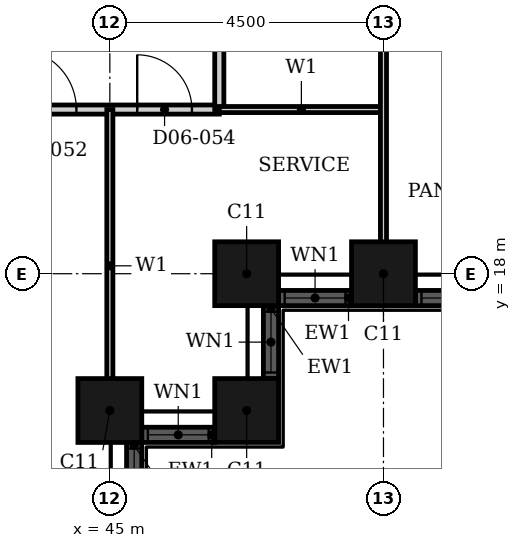
"""IFC4 building model, lengths in metres.
Left out: names, types, materials, properties, quantities, classifications, styles, units other than length and angle.
Written with IfcOpenShell. Run it as: python <this file> out.ifc"""

import sys

from ifc_helpers import new_model, si_unit, direction, frame, frame_2d, origin, origin_2d, place, context, subcontext, project, spatial, rectangle, hollow_rectangle, extrude, element, fill, save


model = new_model("IFC4")
c1 = context("Model", 3, precision=1e-05, world=origin(), true_north=direction((0.0, 1.0)))
c2 = subcontext(c1, "Body", "Model", "MODEL_VIEW")
j1 = project(units=[si_unit("LENGTHUNIT", "METRE"), si_unit("PLANEANGLEUNIT", "RADIAN")], contexts=[c1])
p1 = place(None, origin())
s1 = spatial("IfcSite", under=j1, at=p1, CompositionType="ELEMENT")
p2 = place(p1, origin())
s2 = spatial("IfcBuilding", under=s1, at=p2, CompositionType="ELEMENT")
p3 = place(p2, frame((0.0, 0.0, 33.6)))
s3 = spatial("IfcBuildingStorey", under=s2, at=p3, CompositionType="ELEMENT", Elevation=33.6)
for number, where, z_axis, x_axis in (
    (1, (45.0, 15.75, 0.0), (0.0, 0.0, 1.0), (1.0, 0.0, 0.0)),
    (2, (47.25, 15.75, 0.0), (0.0, 0.0, 1.0), (1.0, 0.0, 0.0)),
    (3, (47.25, 18.0, 0.0), (0.0, 0.0, 1.0), (1.0, 0.0, 0.0)),
    (4, (49.5, 18.0, 0.0), (0.0, 0.0, 1.0), (1.0, 0.0, 0.0)),
):
    element("IfcColumn", number, at=place(p3, frame(where, z_axis=z_axis, x_axis=x_axis)), inside=s3, PredefinedType="COLUMN", context=c2, shape_type="SweptSolid", body=[
        extrude(hollow_rectangle(XDim=1.05, YDim=1.05, WallThickness=0.034, at=origin_2d()), origin(), (0.0, 0.0, 1.0), 3.6),
    ])
p4 = place(p3, frame((45.4, 14.025, 0.0), z_axis=(0.0, 0.0, 1.0), x_axis=(0.0, 1.0, 0.0)))
e5 = element("IfcWall", 5, at=p4, inside=s3, PredefinedType="SOLIDWALL", context=c2, shape_type="SweptSolid", body=[
    extrude(rectangle(XDim=1.2, YDim=0.25, at=frame_2d((0.6, 0.0))), origin(), (0.0, 0.0, 1.0), 3.6),
])
p5 = place(p4, frame((0.1, 0.0, 0.9)))
e6 = element("IfcOpeningElement", 6, at=p5, cuts=e5, PredefinedType="OPENING", context=c2, shape_type="SweptSolid", body=[
    extrude(rectangle(XDim=1.0, YDim=2.08, at=frame_2d((0.5, 1.04))), frame((0.0, 0.135, 0.0), z_axis=(0.0, -1.0, 0.0), x_axis=(1.0, 0.0, 0.0)), (0.0, 0.0, 1.0), 0.27),
])
p6 = place(p3, frame((45.525, 15.35, 0.0), z_axis=(0.0, 0.0, 1.0), x_axis=(1.0, 0.0, 0.0)))
e7 = element("IfcWall", 7, at=p6, inside=s3, PredefinedType="SOLIDWALL", context=c2, shape_type="SweptSolid", body=[
    extrude(rectangle(XDim=1.2, YDim=0.25, at=frame_2d((0.6, 0.0))), origin(), (0.0, 0.0, 1.0), 3.6),
])
p7 = place(p6, frame((0.1, 0.0, 0.9)))
e8 = element("IfcOpeningElement", 8, at=p7, cuts=e7, PredefinedType="OPENING", context=c2, shape_type="SweptSolid", body=[
    extrude(rectangle(XDim=1.0, YDim=2.08, at=frame_2d((0.5, 1.04))), frame((0.0, 0.135, 0.0), z_axis=(0.0, -1.0, 0.0), x_axis=(1.0, 0.0, 0.0)), (0.0, 0.0, 1.0), 0.27),
])
p8 = place(p3, frame((47.65, 16.275, 0.0), z_axis=(0.0, 0.0, 1.0), x_axis=(0.0, 1.0, 0.0)))
e9 = element("IfcWall", 9, at=p8, inside=s3, PredefinedType="SOLIDWALL", context=c2, shape_type="SweptSolid", body=[
    extrude(rectangle(XDim=1.2, YDim=0.25, at=frame_2d((0.6, 0.0))), origin(), (0.0, 0.0, 1.0), 3.6),
])
p9 = place(p8, frame((0.1, 0.0, 0.9)))
e10 = element("IfcOpeningElement", 10, at=p9, cuts=e9, PredefinedType="OPENING", context=c2, shape_type="SweptSolid", body=[
    extrude(rectangle(XDim=1.0, YDim=2.08, at=frame_2d((0.5, 1.04))), frame((0.0, 0.135, 0.0), z_axis=(0.0, -1.0, 0.0), x_axis=(1.0, 0.0, 0.0)), (0.0, 0.0, 1.0), 0.27),
])
p10 = place(p3, frame((47.775, 17.6, 0.0), z_axis=(0.0, 0.0, 1.0), x_axis=(1.0, 0.0, 0.0)))
e11 = element("IfcWall", 11, at=p10, inside=s3, PredefinedType="SOLIDWALL", context=c2, shape_type="SweptSolid", body=[
    extrude(rectangle(XDim=1.2, YDim=0.25, at=frame_2d((0.6, 0.0))), origin(), (0.0, 0.0, 1.0), 3.6),
])
p11 = place(p10, frame((0.1, 0.0, 0.9)))
e12 = element("IfcOpeningElement", 12, at=p11, cuts=e11, PredefinedType="OPENING", context=c2, shape_type="SweptSolid", body=[
    extrude(rectangle(XDim=1.0, YDim=2.08, at=frame_2d((0.5, 1.04))), frame((0.0, 0.135, 0.0), z_axis=(0.0, -1.0, 0.0), x_axis=(1.0, 0.0, 0.0)), (0.0, 0.0, 1.0), 0.27),
])
p12 = place(p3, frame((50.025, 17.6, 0.0), z_axis=(0.0, 0.0, 1.0), x_axis=(1.0, 0.0, 0.0)))
e13 = element("IfcWall", 13, at=p12, inside=s3, PredefinedType="SOLIDWALL", context=c2, shape_type="SweptSolid", body=[
    extrude(rectangle(XDim=7.95, YDim=0.25, at=frame_2d((3.975, 0.0))), origin(), (0.0, 0.0, 1.0), 3.6),
])
p13 = place(p12, frame((0.1, 0.0, 0.9)))
e14 = element("IfcOpeningElement", 14, at=p13, cuts=e13, PredefinedType="OPENING", context=c2, shape_type="SweptSolid", body=[
    extrude(rectangle(XDim=3.25, YDim=2.08, at=frame_2d((1.625, 1.04))), frame((0.0, 0.135, 0.0), z_axis=(0.0, -1.0, 0.0), x_axis=(1.0, 0.0, 0.0)), (0.0, 0.0, 1.0), 0.27),
])
p14 = place(p12, frame((5.325, 0.0, 0.0)))
e15 = element("IfcOpeningElement", 15, at=p14, cuts=e13, PredefinedType="OPENING", context=c2, shape_type="SweptSolid", body=[
    extrude(rectangle(XDim=1.8, YDim=2.4, at=frame_2d((0.9, 1.2))), frame((0.0, 0.135, 0.0), z_axis=(0.0, -1.0, 0.0), x_axis=(1.0, 0.0, 0.0)), (0.0, 0.0, 1.0), 0.27),
])
p15 = place(p3, frame((31.5, 20.7, 0.0), z_axis=(0.0, 0.0, 1.0), x_axis=(1.0, 0.0, 0.0)))
e16 = element("IfcWall", 16, at=p15, inside=s3, PredefinedType="PARTITIONING", context=c2, shape_type="SweptSolid", body=[
    extrude(rectangle(XDim=15.3, YDim=0.15, at=frame_2d((7.65, 0.0))), origin(), (0.0, 0.0, 1.0), 3.3),
])
p16 = place(p15, frame((11.95, 0.0, 0.0)))
e17 = element("IfcOpeningElement", 17, at=p16, cuts=e16, PredefinedType="OPENING", context=c2, shape_type="SweptSolid", body=[
    extrude(rectangle(XDim=1.0, YDim=2.1, at=frame_2d((0.5, 1.05))), frame((0.0, 0.085, 0.0), z_axis=(0.0, -1.0, 0.0), x_axis=(1.0, 0.0, 0.0)), (0.0, 0.0, 1.0), 0.17),
])
p17 = place(p15, frame((13.95, 0.0, 0.0)))
e18 = element("IfcOpeningElement", 18, at=p17, cuts=e16, PredefinedType="OPENING", context=c2, shape_type="SweptSolid", body=[
    extrude(rectangle(XDim=0.9, YDim=2.1, at=frame_2d((0.45, 1.05))), frame((0.0, 0.085, 0.0), z_axis=(0.0, -1.0, 0.0), x_axis=(1.0, 0.0, 0.0)), (0.0, 0.0, 1.0), 0.17),
])
p18 = place(p15, frame((4.05, 0.0, 0.0)))
e19 = element("IfcOpeningElement", 19, at=p18, cuts=e16, PredefinedType="OPENING", context=c2, shape_type="SweptSolid", body=[
    extrude(rectangle(XDim=0.9, YDim=2.1, at=frame_2d((0.45, 1.05))), frame((0.0, 0.085, 0.0), z_axis=(0.0, -1.0, 0.0), x_axis=(1.0, 0.0, 0.0)), (0.0, 0.0, 1.0), 0.17),
])
p19 = place(p3, frame((46.8, 20.7, 0.0), z_axis=(0.0, 0.0, 1.0), x_axis=(0.0, 1.0, 0.0)))
e20 = element("IfcWall", 20, at=p19, inside=s3, PredefinedType="PARTITIONING", context=c2, shape_type="SweptSolid", body=[
    extrude(rectangle(XDim=6.3, YDim=0.15, at=frame_2d((3.15, 0.0))), origin(), (0.0, 0.0, 1.0), 3.3),
])
p20 = place(p19, frame((2.65, 0.0, 0.0)))
e21 = element("IfcOpeningElement", 21, at=p20, cuts=e20, PredefinedType="OPENING", context=c2, shape_type="SweptSolid", body=[
    extrude(rectangle(XDim=0.9, YDim=2.1, at=frame_2d((0.45, 1.05))), frame((0.0, 0.085, 0.0), z_axis=(0.0, -1.0, 0.0), x_axis=(1.0, 0.0, 0.0)), (0.0, 0.0, 1.0), 0.17),
])
p21 = place(p3, frame((46.8, 20.7, 0.0), z_axis=(0.0, 0.0, 1.0), x_axis=(1.0, 0.0, 0.0)))
e22 = element("IfcWall", 22, at=p21, inside=s3, PredefinedType="PARTITIONING", context=c2, shape_type="SweptSolid", body=[
    extrude(rectangle(XDim=2.7, YDim=0.1, at=frame_2d((1.35, 0.0))), origin(), (0.0, 0.0, 1.0), 3.3),
])
p22 = place(p3, frame((45.0, 15.56, 0.0), z_axis=(0.0, 0.0, 1.0), x_axis=(0.0, 1.0, 0.0)))
e23 = element("IfcWall", 23, at=p22, inside=s3, PredefinedType="PARTITIONING", context=c2, shape_type="SweptSolid", body=[
    extrude(rectangle(XDim=5.14, YDim=0.1, at=frame_2d((2.57, 0.0))), origin(), (0.0, 0.0, 1.0), 3.3),
])
p23 = place(p3, frame((49.5, 17.81, 0.0), z_axis=(0.0, 0.0, 1.0), x_axis=(0.0, 1.0, 0.0)))
e24 = element("IfcWall", 24, at=p23, inside=s3, PredefinedType="PARTITIONING", context=c2, shape_type="SweptSolid", body=[
    extrude(rectangle(XDim=9.19, YDim=0.1, at=frame_2d((4.595, 0.0))), origin(), (0.0, 0.0, 1.0), 2.38),
])
p24 = place(p5, origin())
e25 = element("IfcWindow", 25, at=p24, inside=s3, PartitioningType="SINGLE_PANEL", PredefinedType="WINDOW", context=c2, shape_type="SweptSolid", body=[
    extrude(rectangle(XDim=1.0, YDim=2.08, at=frame_2d((0.5, 1.04))), frame((0.0, 0.03, 0.0), z_axis=(0.0, -1.0, 0.0), x_axis=(1.0, 0.0, 0.0)), (0.0, 0.0, 1.0), 0.06),
])
fill(e6, e25)
p25 = place(p7, origin())
e26 = element("IfcWindow", 26, at=p25, inside=s3, PartitioningType="SINGLE_PANEL", PredefinedType="WINDOW", context=c2, shape_type="SweptSolid", body=[
    extrude(rectangle(XDim=1.0, YDim=2.08, at=frame_2d((0.5, 1.04))), frame((0.0, 0.03, 0.0), z_axis=(0.0, -1.0, 0.0), x_axis=(1.0, 0.0, 0.0)), (0.0, 0.0, 1.0), 0.06),
])
fill(e8, e26)
p26 = place(p9, origin())
e27 = element("IfcWindow", 27, at=p26, inside=s3, PartitioningType="SINGLE_PANEL", PredefinedType="WINDOW", context=c2, shape_type="SweptSolid", body=[
    extrude(rectangle(XDim=1.0, YDim=2.08, at=frame_2d((0.5, 1.04))), frame((0.0, 0.03, 0.0), z_axis=(0.0, -1.0, 0.0), x_axis=(1.0, 0.0, 0.0)), (0.0, 0.0, 1.0), 0.06),
])
fill(e10, e27)
p27 = place(p11, origin())
e28 = element("IfcWindow", 28, at=p27, inside=s3, PartitioningType="SINGLE_PANEL", PredefinedType="WINDOW", context=c2, shape_type="SweptSolid", body=[
    extrude(rectangle(XDim=1.0, YDim=2.08, at=frame_2d((0.5, 1.04))), frame((0.0, 0.03, 0.0), z_axis=(0.0, -1.0, 0.0), x_axis=(1.0, 0.0, 0.0)), (0.0, 0.0, 1.0), 0.06),
])
fill(e12, e28)
p28 = place(p13, origin())
e29 = element("IfcWindow", 29, at=p28, inside=s3, PartitioningType="SINGLE_PANEL", PredefinedType="WINDOW", context=c2, shape_type="SweptSolid", body=[
    extrude(rectangle(XDim=3.25, YDim=2.08, at=frame_2d((1.625, 1.04))), frame((0.0, 0.03, 0.0), z_axis=(0.0, -1.0, 0.0), x_axis=(1.0, 0.0, 0.0)), (0.0, 0.0, 1.0), 0.06),
])
fill(e14, e29)
p29 = place(p16, origin())
e30 = element("IfcDoor", 30, at=p29, inside=s3, OperationType="SINGLE_SWING_RIGHT", PredefinedType="DOOR", context=c2, shape_type="SweptSolid", body=[
    extrude(rectangle(XDim=1.0, YDim=2.1, at=frame_2d((0.5, 1.05))), frame((0.0, 0.025, 0.0), z_axis=(0.0, -1.0, 0.0), x_axis=(1.0, 0.0, 0.0)), (0.0, 0.0, 1.0), 0.05),
])
fill(e17, e30)
p30 = place(p17, origin())
e31 = element("IfcDoor", 31, at=p30, inside=s3, OperationType="SINGLE_SWING_RIGHT", PredefinedType="DOOR", context=c2, shape_type="SweptSolid", body=[
    extrude(rectangle(XDim=0.9, YDim=2.1, at=frame_2d((0.45, 1.05))), frame((0.0, 0.025, 0.0), z_axis=(0.0, -1.0, 0.0), x_axis=(1.0, 0.0, 0.0)), (0.0, 0.0, 1.0), 0.05),
])
fill(e18, e31)
save(model, sys.argv[1])
